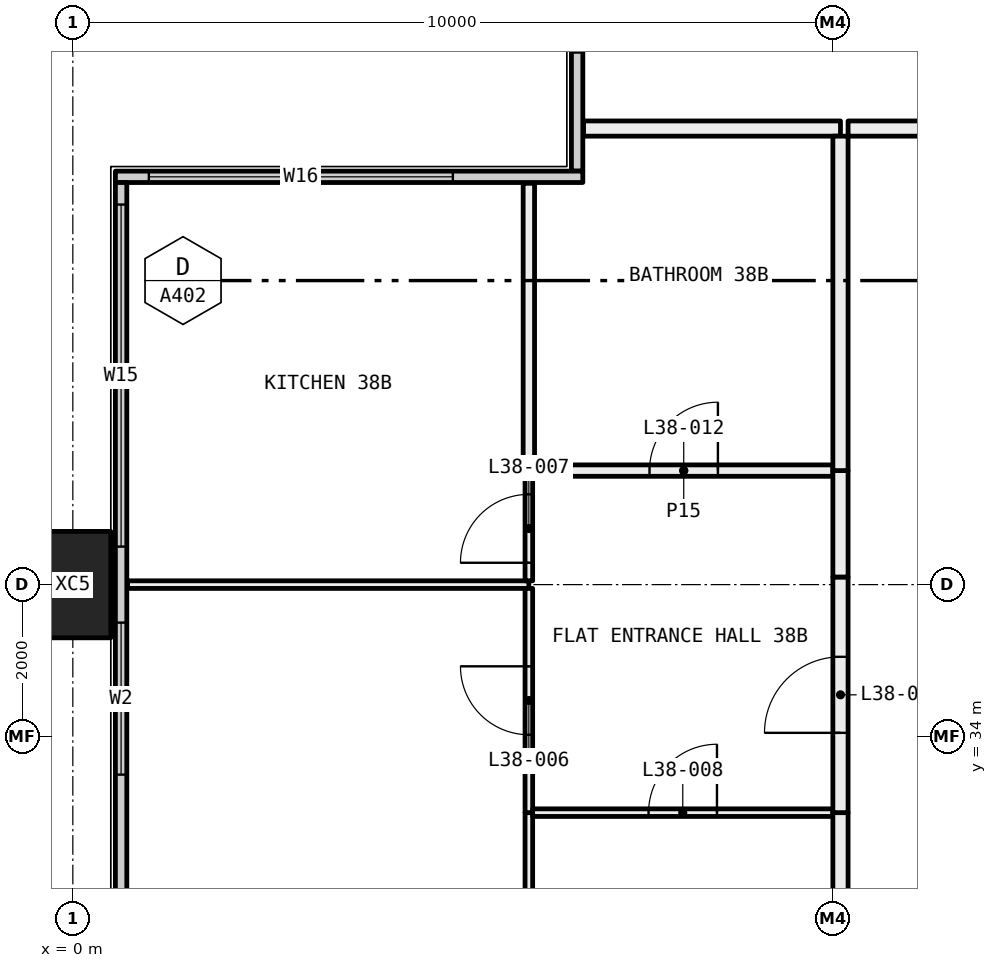
"""IFC4 building model, lengths in metres.
Left out: names, types, materials, properties, quantities, classifications, styles, units other than length and angle.
Written with IfcOpenShell. Run it as: python <this file> out.ifc"""

import sys

from ifc_helpers import new_model, si_unit, direction, frame, frame_2d, origin, origin_2d, place, context, subcontext, project, spatial, rectangle, hollow_rectangle, extrude, element, fill, save


model = new_model("IFC4")
c1 = context("Model", 3, precision=1e-05, world=origin(), true_north=direction((0.0, 1.0)))
c2 = subcontext(c1, "Body", "Model", "MODEL_VIEW")
j1 = project(units=[si_unit("LENGTHUNIT", "METRE"), si_unit("PLANEANGLEUNIT", "RADIAN")], contexts=[c1])
p1 = place(None, origin())
s1 = spatial("IfcSite", under=j1, at=p1, CompositionType="ELEMENT")
p2 = place(p1, origin())
s2 = spatial("IfcBuilding", under=s1, at=p2, CompositionType="ELEMENT")
p3 = place(p2, frame((0.0, 0.0, 144.9)))
s3 = spatial("IfcBuildingStorey", under=s2, at=p3, CompositionType="ELEMENT", Elevation=144.9)
p4 = place(p3, frame((0.0, 36.0, -0.4), z_axis=(0.0, 0.0, 1.0), x_axis=(0.0, 1.0, 0.0)))
e1 = element("IfcColumn", 1, at=p4, inside=s3, PredefinedType="COLUMN", context=c2, shape_type="SweptSolid", body=[
    extrude(hollow_rectangle(XDim=1.4, YDim=1.0, WallThickness=0.055, at=origin_2d()), origin(), (0.0, 0.0, 1.0), 3.45),
])
p5 = place(p3, frame((6.635, 41.44, 0.0), z_axis=(0.0, 0.0, 1.0), x_axis=(0.0, 1.0, 0.0)))
e2 = element("IfcWall", 2, at=p5, inside=s3, PredefinedType="ELEMENTEDWALL", context=c2, shape_type="SweptSolid", body=[
    extrude(rectangle(XDim=5.85, YDim=0.15, at=frame_2d((2.925, 0.0))), origin(), (0.0, 0.0, 1.0), 3.05),
])
p6 = place(p5, frame((1.56, 0.0, 0.45)))
e3 = element("IfcOpeningElement", 3, at=p6, cuts=e2, PredefinedType="OPENING", context=c2, shape_type="SweptSolid", body=[
    extrude(rectangle(XDim=4.0, YDim=2.55, at=frame_2d((2.0, 1.275))), frame((0.0, 0.085, 0.0), z_axis=(0.0, -1.0, 0.0), x_axis=(1.0, 0.0, 0.0)), (0.0, 0.0, 1.0), 0.17),
])
p7 = place(p3, frame((0.56, 41.365, 0.0), z_axis=(0.0, 0.0, 1.0), x_axis=(1.0, 0.0, 0.0)))
e4 = element("IfcWall", 4, at=p7, inside=s3, PredefinedType="ELEMENTEDWALL", context=c2, shape_type="SweptSolid", body=[
    extrude(rectangle(XDim=6.15, YDim=0.15, at=frame_2d((3.075, 0.0))), origin(), (0.0, 0.0, 1.0), 3.05),
])
p8 = place(p7, frame((0.44, 0.0, 0.45)))
e5 = element("IfcOpeningElement", 5, at=p8, cuts=e4, PredefinedType="OPENING", context=c2, shape_type="SweptSolid", body=[
    extrude(rectangle(XDim=4.0, YDim=2.55, at=frame_2d((2.0, 1.275))), frame((0.0, 0.085, 0.0), z_axis=(0.0, -1.0, 0.0), x_axis=(1.0, 0.0, 0.0)), (0.0, 0.0, 1.0), 0.17),
])
p9 = place(p3, frame((0.635, 18.71, 0.0), z_axis=(0.0, 0.0, 1.0), x_axis=(0.0, 1.0, 0.0)))
e6 = element("IfcWall", 6, at=p9, inside=s3, PredefinedType="ELEMENTEDWALL", context=c2, shape_type="SweptSolid", body=[
    extrude(rectangle(XDim=22.58, YDim=0.15, at=frame_2d((11.29, 0.0))), origin(), (0.0, 0.0, 1.0), 3.05),
])
p10 = place(p9, frame((0.29, 0.0, 0.45)))
e7 = element("IfcOpeningElement", 7, at=p10, cuts=e6, PredefinedType="OPENING", context=c2, shape_type="SweptSolid", body=[
    extrude(rectangle(XDim=4.5, YDim=2.55, at=frame_2d((2.25, 1.275))), frame((0.0, 0.085, 0.0), z_axis=(0.0, -1.0, 0.0), x_axis=(1.0, 0.0, 0.0)), (0.0, 0.0, 1.0), 0.17),
])
p11 = place(p9, frame((5.79, 0.0, 0.45)))
e8 = element("IfcOpeningElement", 8, at=p11, cuts=e6, PredefinedType="OPENING", context=c2, shape_type="SweptSolid", body=[
    extrude(rectangle(XDim=2.0, YDim=2.55, at=frame_2d((1.0, 1.275))), frame((0.0, 0.085, 0.0), z_axis=(0.0, -1.0, 0.0), x_axis=(1.0, 0.0, 0.0)), (0.0, 0.0, 1.0), 0.17),
])
p12 = place(p9, frame((10.04, 0.0, 0.45)))
e9 = element("IfcOpeningElement", 9, at=p12, cuts=e6, PredefinedType="OPENING", context=c2, shape_type="SweptSolid", body=[
    extrude(rectangle(XDim=0.75, YDim=2.55, at=frame_2d((0.375, 1.275))), frame((0.0, 0.085, 0.0), z_axis=(0.0, -1.0, 0.0), x_axis=(1.0, 0.0, 0.0)), (0.0, 0.0, 1.0), 0.17),
])
p13 = place(p9, frame((11.79, 0.0, 0.45)))
e10 = element("IfcOpeningElement", 10, at=p13, cuts=e6, PredefinedType="OPENING", context=c2, shape_type="SweptSolid", body=[
    extrude(rectangle(XDim=0.75, YDim=2.55, at=frame_2d((0.375, 1.275))), frame((0.0, 0.085, 0.0), z_axis=(0.0, -1.0, 0.0), x_axis=(1.0, 0.0, 0.0)), (0.0, 0.0, 1.0), 0.17),
])
p14 = place(p9, frame((14.79, 0.0, 0.45)))
e11 = element("IfcOpeningElement", 11, at=p14, cuts=e6, PredefinedType="OPENING", context=c2, shape_type="SweptSolid", body=[
    extrude(rectangle(XDim=2.0, YDim=2.55, at=frame_2d((1.0, 1.275))), frame((0.0, 0.085, 0.0), z_axis=(0.0, -1.0, 0.0), x_axis=(1.0, 0.0, 0.0)), (0.0, 0.0, 1.0), 0.17),
])
p15 = place(p9, frame((17.79, 0.0, 0.45)))
e12 = element("IfcOpeningElement", 12, at=p15, cuts=e6, PredefinedType="OPENING", context=c2, shape_type="SweptSolid", body=[
    extrude(rectangle(XDim=4.5, YDim=2.55, at=frame_2d((2.25, 1.275))), frame((0.0, 0.085, 0.0), z_axis=(0.0, -1.0, 0.0), x_axis=(1.0, 0.0, 0.0)), (0.0, 0.0, 1.0), 0.17),
])
p16 = place(p3, frame((6.0, 36.0, 0.0), z_axis=(0.0, 0.0, 1.0), x_axis=(-1.0, 0.0, 0.0)))
e13 = element("IfcWall", 13, at=p16, inside=s3, PredefinedType="PARTITIONING", context=c2, shape_type="SweptSolid", body=[
    extrude(rectangle(XDim=5.28, YDim=0.1, at=frame_2d((2.64, 0.0))), origin(), (0.0, 0.0, 1.0), 2.45),
])
p17 = place(p3, frame((6.0, 24.05, 0.0), z_axis=(0.0, 0.0, 1.0), x_axis=(0.0, 1.0, 0.0)))
e14 = element("IfcWall", 14, at=p17, inside=s3, PredefinedType="PARTITIONING", context=c2, shape_type="SweptSolid", body=[
    extrude(rectangle(XDim=8.95, YDim=0.1, at=frame_2d((4.475, 0.0))), origin(), (0.0, 0.0, 1.0), 2.45),
])
p18 = place(p3, frame((6.0, 33.0, 0.0), z_axis=(0.0, 0.0, 1.0), x_axis=(0.0, 1.0, 0.0)))
e15 = element("IfcWall", 15, at=p18, inside=s3, PredefinedType="PARTITIONING", context=c2, shape_type="SweptSolid", body=[
    extrude(rectangle(XDim=2.95, YDim=0.1, at=frame_2d((1.475, 0.0))), origin(), (0.0, 0.0, 1.0), 2.45),
])
p19 = place(p18, frame((1.025, 0.0, 0.0)))
e16 = element("IfcOpeningElement", 16, at=p19, cuts=e15, PredefinedType="OPENING", context=c2, shape_type="SweptSolid", body=[
    extrude(rectangle(XDim=0.9, YDim=2.1, at=frame_2d((0.45, 1.05))), frame((0.0, 0.06, 0.0), z_axis=(0.0, -1.0, 0.0), x_axis=(1.0, 0.0, 0.0)), (0.0, 0.0, 1.0), 0.12),
])
p20 = place(p3, frame((6.0, 36.05, 0.0), z_axis=(0.0, 0.0, 1.0), x_axis=(0.0, 1.0, 0.0)))
e17 = element("IfcWall", 17, at=p20, inside=s3, PredefinedType="PARTITIONING", context=c2, shape_type="SweptSolid", body=[
    extrude(rectangle(XDim=1.375, YDim=0.1, at=frame_2d((0.688, 0.0))), origin(), (0.0, 0.0, 1.0), 2.45),
])
p21 = place(p20, frame((0.238, 0.0, 0.0)))
e18 = element("IfcOpeningElement", 18, at=p21, cuts=e17, PredefinedType="OPENING", context=c2, shape_type="SweptSolid", body=[
    extrude(rectangle(XDim=0.9, YDim=2.1, at=frame_2d((0.45, 1.05))), frame((0.0, 0.06, 0.0), z_axis=(0.0, -1.0, 0.0), x_axis=(1.0, 0.0, 0.0)), (0.0, 0.0, 1.0), 0.12),
])
p22 = place(p3, frame((6.0, 37.5, 0.0), z_axis=(0.0, 0.0, 1.0), x_axis=(0.0, 1.0, 0.0)))
e19 = element("IfcWall", 19, at=p22, inside=s3, PredefinedType="PARTITIONING", context=c2, shape_type="SweptSolid", body=[
    extrude(rectangle(XDim=3.78, YDim=0.15, at=frame_2d((1.89, 0.0))), origin(), (0.0, 0.0, 1.0), 3.05),
])
p23 = place(p3, frame((10.0, 33.0, 0.0), z_axis=(0.0, 0.0, 1.0), x_axis=(-1.0, 0.0, 0.0)))
e20 = element("IfcWall", 20, at=p23, inside=s3, PredefinedType="PARTITIONING", context=c2, shape_type="SweptSolid", body=[
    extrude(rectangle(XDim=3.95, YDim=0.1, at=frame_2d((1.975, 0.0))), origin(), (0.0, 0.0, 1.0), 3.05),
])
p24 = place(p23, frame((1.525, 0.0, 0.0)))
e21 = element("IfcOpeningElement", 21, at=p24, cuts=e20, PredefinedType="OPENING", context=c2, shape_type="SweptSolid", body=[
    extrude(rectangle(XDim=0.9, YDim=2.1, at=frame_2d((0.45, 1.05))), frame((0.0, 0.06, 0.0), z_axis=(0.0, -1.0, 0.0), x_axis=(1.0, 0.0, 0.0)), (0.0, 0.0, 1.0), 0.12),
])
p25 = place(p3, frame((10.1, 24.1, 0.0), z_axis=(0.0, 0.0, 1.0), x_axis=(0.0, 1.0, 0.0)))
e22 = element("IfcWall", 22, at=p25, inside=s3, PredefinedType="PARTITIONING", context=c2, shape_type="SweptSolid", body=[
    extrude(rectangle(XDim=8.9, YDim=0.2, at=frame_2d((4.45, 0.0))), origin(), (0.0, 0.0, 1.0), 3.05),
])
p26 = place(p3, frame((10.0, 37.5, 0.0), z_axis=(0.0, 0.0, 1.0), x_axis=(-1.0, 0.0, 0.0)))
e23 = element("IfcWall", 23, at=p26, inside=s3, PredefinedType="PARTITIONING", context=c2, shape_type="SweptSolid", body=[
    extrude(rectangle(XDim=3.925, YDim=0.15, at=frame_2d((1.962, 0.0))), origin(), (0.0, 0.0, 1.0), 3.05),
])
p27 = place(p26, frame((1.512, 0.0, 0.0)))
e24 = element("IfcOpeningElement", 24, at=p27, cuts=e23, PredefinedType="OPENING", context=c2, shape_type="SweptSolid", body=[
    extrude(rectangle(XDim=0.9, YDim=2.1, at=frame_2d((0.45, 1.05))), frame((0.0, 0.085, 0.0), z_axis=(0.0, -1.0, 0.0), x_axis=(1.0, 0.0, 0.0)), (0.0, 0.0, 1.0), 0.17),
])
p28 = place(p3, frame((10.1, 33.0, 0.0), z_axis=(0.0, 0.0, 1.0), x_axis=(0.0, 1.0, 0.0)))
e25 = element("IfcWall", 25, at=p28, inside=s3, PredefinedType="PARTITIONING", context=c2, shape_type="SweptSolid", body=[
    extrude(rectangle(XDim=3.1, YDim=0.2, at=frame_2d((1.55, 0.0))), origin(), (0.0, 0.0, 1.0), 2.45),
])
p29 = place(p28, frame((1.05, 0.0, 0.0)))
e26 = element("IfcOpeningElement", 26, at=p29, cuts=e25, PredefinedType="OPENING", context=c2, shape_type="SweptSolid", body=[
    extrude(rectangle(XDim=1.0, YDim=2.1, at=frame_2d((0.5, 1.05))), frame((0.0, 0.11, 0.0), z_axis=(0.0, -1.0, 0.0), x_axis=(1.0, 0.0, 0.0)), (0.0, 0.0, 1.0), 0.22),
])
p30 = place(p3, frame((10.1, 36.1, 0.0), z_axis=(0.0, 0.0, 1.0), x_axis=(0.0, 1.0, 0.0)))
e27 = element("IfcWall", 27, at=p30, inside=s3, PredefinedType="PARTITIONING", context=c2, shape_type="SweptSolid", body=[
    extrude(rectangle(XDim=1.4, YDim=0.2, at=frame_2d((0.7, 0.0))), origin(), (0.0, 0.0, 1.0), 3.05),
])
p31 = place(p3, frame((10.1, 42.0, 0.0), z_axis=(0.0, 0.0, 1.0), x_axis=(-1.0, 0.0, 0.0)))
e28 = element("IfcWall", 28, at=p31, inside=s3, PredefinedType="PARTITIONING", context=c2, shape_type="SweptSolid", body=[
    extrude(rectangle(XDim=3.38, YDim=0.2, at=frame_2d((1.69, 0.0))), origin(), (0.0, 0.0, 1.0), 3.05),
])
p32 = place(p3, frame((10.1, 37.5, 0.0), z_axis=(0.0, 0.0, 1.0), x_axis=(0.0, 1.0, 0.0)))
e29 = element("IfcWall", 29, at=p32, inside=s3, PredefinedType="PARTITIONING", context=c2, shape_type="SweptSolid", body=[
    extrude(rectangle(XDim=4.4, YDim=0.2, at=frame_2d((2.2, 0.0))), origin(), (0.0, 0.0, 1.0), 3.05),
])
p33 = place(p3, frame((10.2, 42.0, 0.0), z_axis=(0.0, 0.0, 1.0), x_axis=(1.0, 0.0, 0.0)))
e30 = element("IfcWall", 30, at=p33, inside=s3, PredefinedType="PARTITIONING", context=c2, shape_type="SweptSolid", body=[
    extrude(rectangle(XDim=1.8, YDim=0.2, at=frame_2d((0.9, 0.0))), origin(), (0.0, 0.0, 1.0), 3.05),
])
p34 = place(p8, origin())
e31 = element("IfcWindow", 31, at=p34, inside=s3, PartitioningType="SINGLE_PANEL", PredefinedType="WINDOW", context=c2, shape_type="SweptSolid", body=[
    extrude(rectangle(XDim=4.0, YDim=2.55, at=frame_2d((2.0, 1.275))), frame((0.0, 0.03, 0.0), z_axis=(0.0, -1.0, 0.0), x_axis=(1.0, 0.0, 0.0)), (0.0, 0.0, 1.0), 0.06),
])
fill(e5, e31)
p35 = place(p14, origin())
e32 = element("IfcWindow", 32, at=p35, inside=s3, PartitioningType="SINGLE_PANEL", PredefinedType="WINDOW", context=c2, shape_type="SweptSolid", body=[
    extrude(rectangle(XDim=2.0, YDim=2.55, at=frame_2d((1.0, 1.275))), frame((0.0, 0.03, 0.0), z_axis=(0.0, -1.0, 0.0), x_axis=(1.0, 0.0, 0.0)), (0.0, 0.0, 1.0), 0.06),
])
fill(e11, e32)
p36 = place(p15, origin())
e33 = element("IfcWindow", 33, at=p36, inside=s3, PartitioningType="SINGLE_PANEL", PredefinedType="WINDOW", context=c2, shape_type="SweptSolid", body=[
    extrude(rectangle(XDim=4.5, YDim=2.55, at=frame_2d((2.25, 1.275))), frame((0.0, 0.03, 0.0), z_axis=(0.0, -1.0, 0.0), x_axis=(1.0, 0.0, 0.0)), (0.0, 0.0, 1.0), 0.06),
])
fill(e12, e33)
p37 = place(p29, origin())
e34 = element("IfcDoor", 34, at=p37, inside=s3, OperationType="SINGLE_SWING_RIGHT", PredefinedType="DOOR", context=c2, shape_type="SweptSolid", body=[
    extrude(rectangle(XDim=1.0, YDim=2.1, at=frame_2d((0.5, 1.05))), frame((0.0, 0.025, 0.0), z_axis=(0.0, -1.0, 0.0), x_axis=(1.0, 0.0, 0.0)), (0.0, 0.0, 1.0), 0.05),
])
fill(e26, e34)
p38 = place(p19, origin())
e35 = element("IfcDoor", 35, at=p38, inside=s3, OperationType="SINGLE_SWING_LEFT", PredefinedType="DOOR", context=c2, shape_type="SweptSolid", body=[
    extrude(rectangle(XDim=0.9, YDim=2.1, at=frame_2d((0.45, 1.05))), frame((0.0, 0.025, 0.0), z_axis=(0.0, -1.0, 0.0), x_axis=(1.0, 0.0, 0.0)), (0.0, 0.0, 1.0), 0.05),
])
fill(e16, e35)
p39 = place(p21, origin())
e36 = element("IfcDoor", 36, at=p39, inside=s3, OperationType="SINGLE_SWING_RIGHT", PredefinedType="DOOR", context=c2, shape_type="SweptSolid", body=[
    extrude(rectangle(XDim=0.9, YDim=2.1, at=frame_2d((0.45, 1.05))), frame((0.0, 0.025, 0.0), z_axis=(0.0, -1.0, 0.0), x_axis=(1.0, 0.0, 0.0)), (0.0, 0.0, 1.0), 0.05),
])
fill(e18, e36)
p40 = place(p24, frame((0.9, 0.0, 0.0), x_axis=(-1.0, 0.0, 0.0)))
e37 = element("IfcDoor", 37, at=p40, inside=s3, OperationType="SINGLE_SWING_LEFT", PredefinedType="DOOR", context=c2, shape_type="SweptSolid", body=[
    extrude(rectangle(XDim=0.9, YDim=2.1, at=frame_2d((0.45, 1.05))), frame((0.0, 0.025, 0.0), z_axis=(0.0, -1.0, 0.0), x_axis=(1.0, 0.0, 0.0)), (0.0, 0.0, 1.0), 0.05),
])
fill(e21, e37)
p41 = place(p27, frame((0.9, 0.0, 0.0), x_axis=(-1.0, 0.0, 0.0)))
e38 = element("IfcDoor", 38, at=p41, inside=s3, OperationType="SINGLE_SWING_LEFT", PredefinedType="DOOR", context=c2, shape_type="SweptSolid", body=[
    extrude(rectangle(XDim=0.9, YDim=2.1, at=frame_2d((0.45, 1.05))), frame((0.0, 0.025, 0.0), z_axis=(0.0, -1.0, 0.0), x_axis=(1.0, 0.0, 0.0)), (0.0, 0.0, 1.0), 0.05),
])
fill(e24, e38)
save(model, sys.argv[1])
